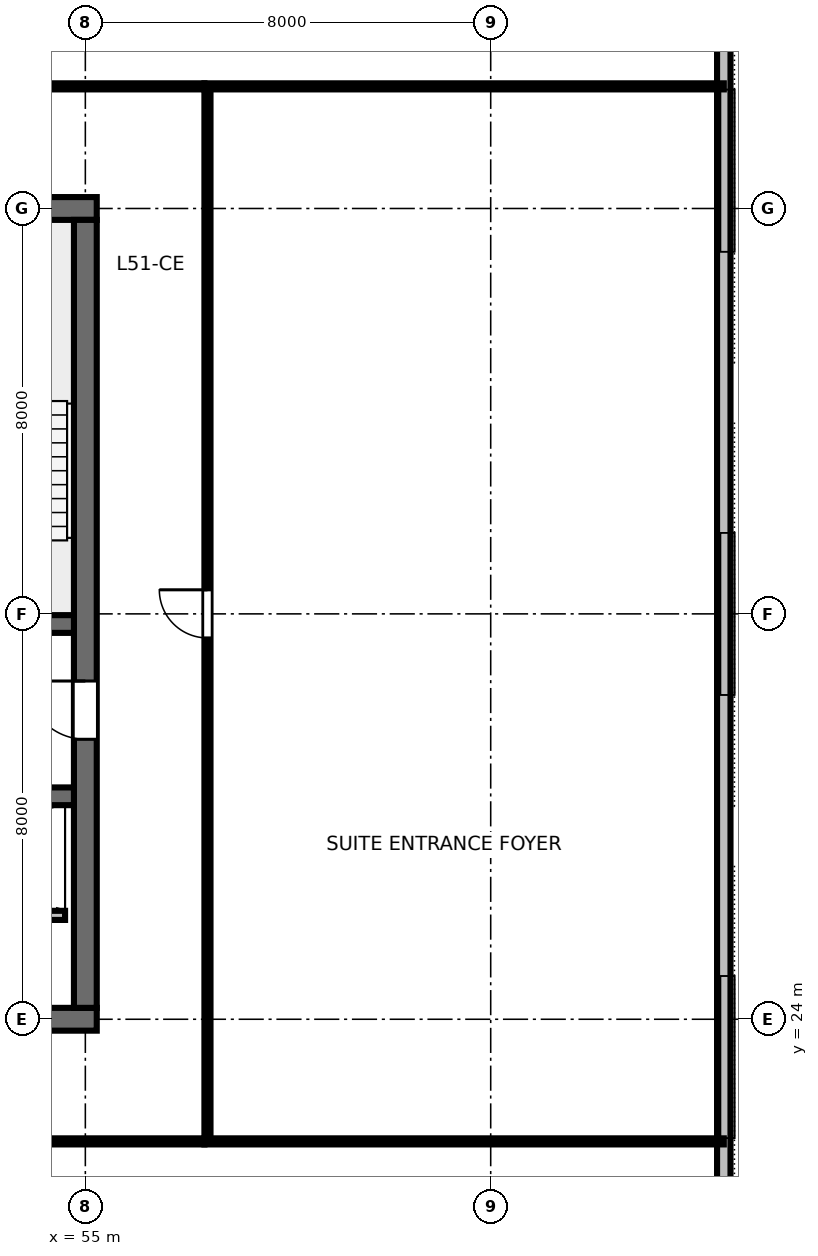
"""IFC4 building model, lengths in metres.
Left out: names, types, materials, properties, quantities, classifications, styles, units other than length and angle.
Written with IfcOpenShell. Run it as: python <this file> out.ifc"""

import sys

from ifc_helpers import new_model, si_unit, direction, frame, frame_2d, origin, origin_2d, place, context, subcontext, project, spatial, rectangle, i_section, extrude, element, fill, save


model = new_model("IFC4")
c1 = context("Model", 3, precision=1e-05, world=origin(), true_north=direction((0.0, 1.0)))
c2 = subcontext(c1, "Body", "Model", "MODEL_VIEW")
j1 = project(units=[si_unit("LENGTHUNIT", "METRE"), si_unit("PLANEANGLEUNIT", "RADIAN")], contexts=[c1])
p1 = place(None, origin())
s1 = spatial("IfcSite", under=j1, at=p1, CompositionType="ELEMENT")
p2 = place(p1, origin())
s2 = spatial("IfcBuilding", under=s1, at=p2, CompositionType="ELEMENT")
p3 = place(p2, frame((0.0, 0.0, 195.0)))
s3 = spatial("IfcBuildingStorey", under=s2, at=p3, CompositionType="ELEMENT", Elevation=195.0)
p4 = place(p3, frame((36.775, 24.0, 0.0), z_axis=(0.0, 0.0, 1.0), x_axis=(1.0, 0.0, 0.0)))
e1 = element("IfcWall", 1, at=p4, inside=s3, PredefinedType="SHEAR", context=c2, shape_type="SweptSolid", body=[
    extrude(rectangle(XDim=18.45, YDim=0.45, at=frame_2d((9.225, 0.0))), origin(), (0.0, 0.0, 1.0), 3.36),
])
p5 = place(p4, frame((13.425, 0.0, 0.0)))
e2 = element("IfcOpeningElement", 2, at=p5, cuts=e1, PredefinedType="OPENING", context=c2, shape_type="SweptSolid", body=[
    extrude(rectangle(XDim=1.6, YDim=2.15, at=frame_2d((0.8, 1.075))), frame((0.0, 0.235, 0.0), z_axis=(0.0, -1.0, 0.0), x_axis=(1.0, 0.0, 0.0)), (0.0, 0.0, 1.0), 0.47),
])
p6 = place(p3, frame((36.775, 40.0, 0.0), z_axis=(0.0, 0.0, 1.0), x_axis=(1.0, 0.0, 0.0)))
e3 = element("IfcWall", 3, at=p6, inside=s3, PredefinedType="SHEAR", context=c2, shape_type="SweptSolid", body=[
    extrude(rectangle(XDim=18.45, YDim=0.45, at=frame_2d((9.225, 0.0))), origin(), (0.0, 0.0, 1.0), 3.36),
])
p7 = place(p6, frame((8.725, 0.0, 0.0)))
e4 = element("IfcOpeningElement", 4, at=p7, cuts=e3, PredefinedType="OPENING", context=c2, shape_type="SweptSolid", body=[
    extrude(rectangle(XDim=1.0, YDim=2.15, at=frame_2d((0.5, 1.075))), frame((0.0, 0.235, 0.0), z_axis=(0.0, -1.0, 0.0), x_axis=(1.0, 0.0, 0.0)), (0.0, 0.0, 1.0), 0.47),
])
p8 = place(p3, frame((55.0, 24.225, 0.0), z_axis=(0.0, 0.0, 1.0), x_axis=(0.0, 1.0, 0.0)))
e5 = element("IfcWall", 5, at=p8, inside=s3, PredefinedType="SHEAR", context=c2, shape_type="SweptSolid", body=[
    extrude(rectangle(XDim=15.55, YDim=0.45, at=frame_2d((7.775, 0.0))), origin(), (0.0, 0.0, 1.0), 3.36),
])
p9 = place(p8, frame((5.3, 0.0, 0.0)))
e6 = element("IfcOpeningElement", 6, at=p9, cuts=e5, PredefinedType="OPENING", context=c2, shape_type="SweptSolid", body=[
    extrude(rectangle(XDim=1.15, YDim=2.15, at=frame_2d((0.575, 1.075))), frame((0.0, 0.235, 0.0), z_axis=(0.0, -1.0, 0.0), x_axis=(1.0, 0.0, 0.0)), (0.0, 0.0, 1.0), 0.47),
])
p10 = place(p3, frame((37.225, 31.8, 0.0), z_axis=(0.0, 0.0, 1.0), x_axis=(1.0, 0.0, 0.0)))
e7 = element("IfcWall", 7, at=p10, inside=s3, PredefinedType="SHEAR", context=c2, shape_type="SweptSolid", body=[
    extrude(rectangle(XDim=17.55, YDim=0.35, at=frame_2d((8.775, 0.0))), origin(), (0.0, 0.0, 1.0), 3.36),
])
p11 = place(p10, frame((0.825, 0.0, 0.0)))
e8 = element("IfcOpeningElement", 8, at=p11, cuts=e7, PredefinedType="OPENING", context=c2, shape_type="SweptSolid", body=[
    extrude(rectangle(XDim=1.1, YDim=2.15, at=frame_2d((0.55, 1.075))), frame((0.0, 0.185, 0.0), z_axis=(0.0, -1.0, 0.0), x_axis=(1.0, 0.0, 0.0)), (0.0, 0.0, 1.0), 0.37),
])
p12 = place(p10, frame((14.725, 0.0, 0.0)))
e9 = element("IfcOpeningElement", 9, at=p12, cuts=e7, PredefinedType="OPENING", context=c2, shape_type="SweptSolid", body=[
    extrude(rectangle(XDim=1.1, YDim=2.15, at=frame_2d((0.55, 1.075))), frame((0.0, 0.185, 0.0), z_axis=(0.0, -1.0, 0.0), x_axis=(1.0, 0.0, 0.0)), (0.0, 0.0, 1.0), 0.37),
])
p13 = place(p3, frame((37.225, 28.4, 0.0), z_axis=(0.0, 0.0, 1.0), x_axis=(1.0, 0.0, 0.0)))
e10 = element("IfcWall", 10, at=p13, inside=s3, PredefinedType="SHEAR", context=c2, shape_type="SweptSolid", body=[
    extrude(rectangle(XDim=17.55, YDim=0.35, at=frame_2d((8.775, 0.0))), origin(), (0.0, 0.0, 1.0), 3.36),
])
p14 = place(p3, frame((68.26, 32.0, 0.0), z_axis=(-0.225307554603, 0.0, 0.974287691516), x_axis=(0.974287691516, 0.0, 0.225307554603)))
e11 = element("IfcColumn", 11, at=p14, inside=s3, PredefinedType="COLUMN", context=c2, shape_type="SweptSolid", body=[
    extrude(i_section(OverallWidth=0.401, OverallDepth=0.399, WebThickness=0.025, FlangeThickness=0.04, FilletRadius=0.025, at=origin_2d()), origin(), (0.0, 0.0, 1.0), 3.462),
])
p15 = place(p3, frame((67.6, 17.98, 0.0), z_axis=(0.0, 0.0, 1.0), x_axis=(0.0, 1.0, 0.0)))
e12 = element("IfcWall", 12, at=p15, inside=s3, PredefinedType="STANDARD", context=c2, shape_type="SweptSolid", body=[
    extrude(rectangle(XDim=28.04, YDim=0.265, at=frame_2d((14.02, 0.0))), origin(), (0.0, 0.0, 1.0), 2.832),
])
p16 = place(p3, frame((47.6, 26.05, 0.0), z_axis=(0.0, 0.0, 1.0), x_axis=(1.0, 0.0, 0.0)))
e13 = element("IfcWall", 13, at=p16, inside=s3, PredefinedType="PARTITIONING", context=c2, shape_type="SweptSolid", body=[
    extrude(rectangle(XDim=7.0, YDim=0.18, at=frame_2d((3.5, 0.0))), origin(), (0.0, 0.0, 1.0), 3.375),
])
p17 = place(p16, frame((1.2, 0.0, 0.0)))
e14 = element("IfcOpeningElement", 14, at=p17, cuts=e13, PredefinedType="OPENING", context=c2, shape_type="SweptSolid", body=[
    extrude(rectangle(XDim=1.05, YDim=2.15, at=frame_2d((0.525, 1.075))), frame((0.0, 0.1, 0.0), z_axis=(0.0, -1.0, 0.0), x_axis=(1.0, 0.0, 0.0)), (0.0, 0.0, 1.0), 0.2),
])
p18 = place(p16, frame((3.4, 0.0, 0.0)))
e15 = element("IfcOpeningElement", 15, at=p18, cuts=e13, PredefinedType="OPENING", context=c2, shape_type="SweptSolid", body=[
    extrude(rectangle(XDim=1.05, YDim=2.15, at=frame_2d((0.525, 1.075))), frame((0.0, 0.1, 0.0), z_axis=(0.0, -1.0, 0.0), x_axis=(1.0, 0.0, 0.0)), (0.0, 0.0, 1.0), 0.2),
])
p19 = place(p3, frame((47.02, 21.59, 0.0), z_axis=(0.0, 0.0, 1.0), x_axis=(1.0, 0.0, 0.0)))
e16 = element("IfcWall", 16, at=p19, inside=s3, PredefinedType="PARTITIONING", context=c2, shape_type="SweptSolid", body=[
    extrude(rectangle(XDim=10.33, YDim=0.12, at=frame_2d((5.165, 0.0))), origin(), (0.0, 0.0, 1.0), 2.655),
])
p20 = place(p19, frame((4.924, 0.0, 0.0)))
e17 = element("IfcOpeningElement", 17, at=p20, cuts=e16, PredefinedType="OPENING", context=c2, shape_type="SweptSolid", body=[
    extrude(rectangle(XDim=0.95, YDim=2.15, at=frame_2d((0.475, 1.075))), frame((0.0, 0.07, 0.0), z_axis=(0.0, -1.0, 0.0), x_axis=(1.0, 0.0, 0.0)), (0.0, 0.0, 1.0), 0.14),
])
p21 = place(p3, frame((47.02, 42.41, 0.0), z_axis=(0.0, 0.0, 1.0), x_axis=(1.0, 0.0, 0.0)))
e18 = element("IfcWall", 18, at=p21, inside=s3, PredefinedType="PARTITIONING", context=c2, shape_type="SweptSolid", body=[
    extrude(rectangle(XDim=10.33, YDim=0.12, at=frame_2d((5.165, 0.0))), origin(), (0.0, 0.0, 1.0), 2.655),
])
p22 = place(p21, frame((4.986, 0.0, 0.0)))
e19 = element("IfcOpeningElement", 19, at=p22, cuts=e18, PredefinedType="OPENING", context=c2, shape_type="SweptSolid", body=[
    extrude(rectangle(XDim=0.95, YDim=2.15, at=frame_2d((0.475, 1.075))), frame((0.0, 0.07, 0.0), z_axis=(0.0, -1.0, 0.0), x_axis=(1.0, 0.0, 0.0)), (0.0, 0.0, 1.0), 0.14),
])
p23 = place(p3, frame((57.41, 21.65, 0.0), z_axis=(0.0, 0.0, 1.0), x_axis=(0.0, 1.0, 0.0)))
e20 = element("IfcWall", 20, at=p23, inside=s3, PredefinedType="PARTITIONING", context=c2, shape_type="SweptSolid", body=[
    extrude(rectangle(XDim=20.7, YDim=0.12, at=frame_2d((10.35, 0.0))), origin(), (0.0, 0.0, 1.0), 2.655),
])
p24 = place(p23, frame((9.875, 0.0, 0.0)))
e21 = element("IfcOpeningElement", 21, at=p24, cuts=e20, PredefinedType="OPENING", context=c2, shape_type="SweptSolid", body=[
    extrude(rectangle(XDim=0.95, YDim=2.15, at=frame_2d((0.475, 1.075))), frame((0.0, 0.07, 0.0), z_axis=(0.0, -1.0, 0.0), x_axis=(1.0, 0.0, 0.0)), (0.0, 0.0, 1.0), 0.14),
])
for number, where, z_axis, x_axis in (
    (22, (57.35, 21.59, 0.0), (0.0, 0.0, 1.0), (1.0, 0.0, 0.0)),
    (23, (57.35, 42.41, 0.0), (0.0, 0.0, 1.0), (1.0, 0.0, 0.0)),
):
    element("IfcWall", number, at=place(p3, frame(where, z_axis=z_axis, x_axis=x_axis)), inside=s3, PredefinedType="PARTITIONING", context=c2, shape_type="SweptSolid", body=[
        extrude(rectangle(XDim=10.25, YDim=0.12, at=frame_2d((5.125, 0.0))), origin(), (0.0, 0.0, 1.0), 2.655),
    ])
p25 = place(p9, origin())
e24 = element("IfcDoor", 24, at=p25, inside=s3, OperationType="SINGLE_SWING_RIGHT", PredefinedType="DOOR", context=c2, shape_type="SweptSolid", body=[
    extrude(rectangle(XDim=1.15, YDim=2.15, at=frame_2d((0.575, 1.075))), frame((0.0, 0.025, 0.0), z_axis=(0.0, -1.0, 0.0), x_axis=(1.0, 0.0, 0.0)), (0.0, 0.0, 1.0), 0.05),
])
fill(e6, e24)
p26 = place(p24, origin())
e25 = element("IfcDoor", 25, at=p26, inside=s3, OperationType="SINGLE_SWING_RIGHT", PredefinedType="DOOR", context=c2, shape_type="SweptSolid", body=[
    extrude(rectangle(XDim=0.95, YDim=2.15, at=frame_2d((0.475, 1.075))), frame((0.0, 0.025, 0.0), z_axis=(0.0, -1.0, 0.0), x_axis=(1.0, 0.0, 0.0)), (0.0, 0.0, 1.0), 0.05),
])
fill(e21, e25)
save(model, sys.argv[1])
